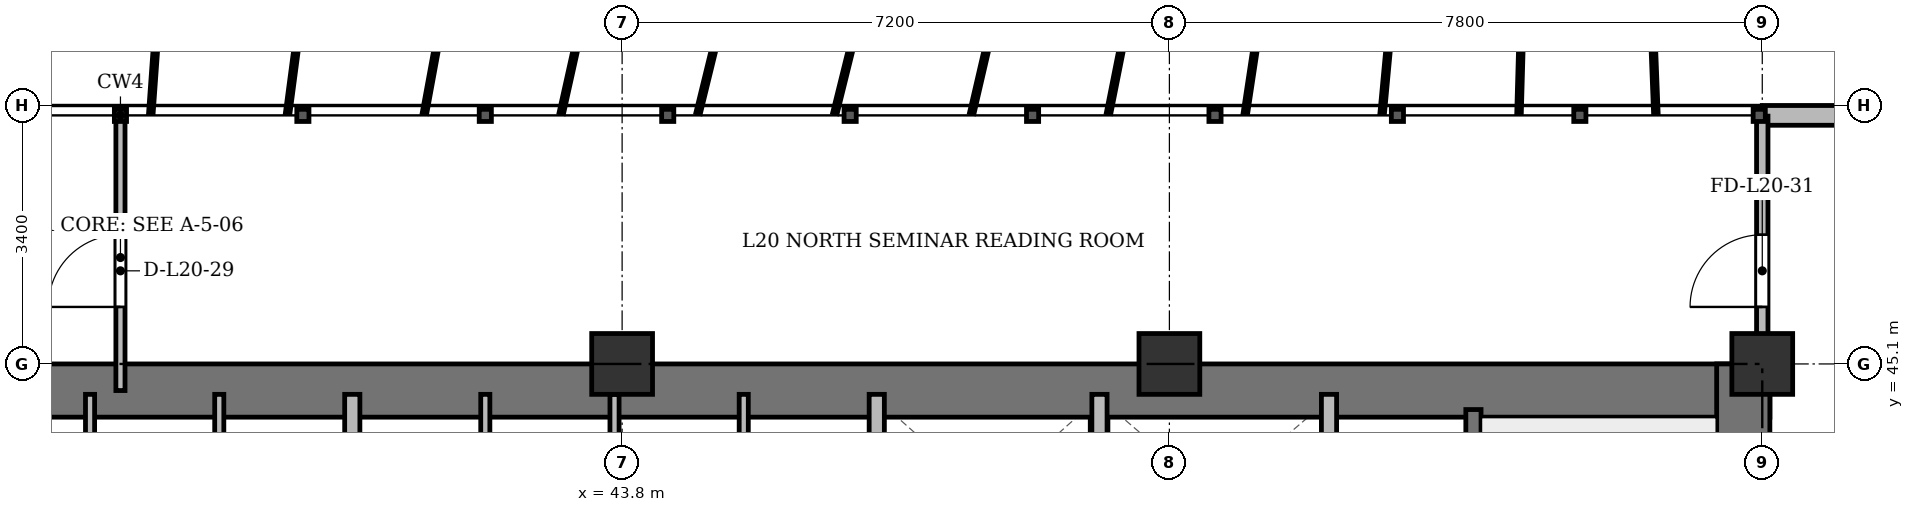
"""IFC4 building model, lengths in metres.
Left out: names, types, materials, properties, quantities, classifications, styles, units other than length and angle.
Written with IfcOpenShell. Run it as: python <this file> out.ifc"""

import sys

from ifc_helpers import new_model, si_unit, direction, frame, frame_2d, origin, origin_2d, place, context, subcontext, project, spatial, rectangle, extrude, source, transform, mapped, element, fill, save


model = new_model("IFC4")
c1 = context("Model", 3, precision=1e-05, world=origin(), true_north=direction((0.0, 1.0)))
c2 = subcontext(c1, "Body", "Model", "MODEL_VIEW")
j1 = project(units=[si_unit("LENGTHUNIT", "METRE"), si_unit("PLANEANGLEUNIT", "RADIAN")], contexts=[c1])
p1 = place(None, origin())
s1 = spatial("IfcSite", under=j1, at=p1, CompositionType="ELEMENT")
p2 = place(p1, origin())
s2 = spatial("IfcBuilding", under=s1, at=p2, CompositionType="ELEMENT")
p3 = place(p2, frame((0.0, 0.0, 81.7)))
s3 = spatial("IfcBuildingStorey", under=s2, at=p3, CompositionType="ELEMENT", Elevation=81.7)
m1 = source(origin(), c2, "Body", "SweptSolid", [
    extrude(rectangle(XDim=0.8, YDim=0.8, at=origin_2d()), origin(), (0.0, 0.0, 1.0), 3.6),
])
for number, where, z_axis, x_axis in (
    (1, (43.8, 45.1, 0.0), (0.0, 0.0, 1.0), (1.0, 0.0, 0.0)),
    (2, (51.0, 45.1, 0.0), (0.0, 0.0, 1.0), (1.0, 0.0, 0.0)),
    (3, (58.8, 45.1, 0.0), (0.0, 0.0, 1.0), (1.0, 0.0, 0.0)),
):
    element("IfcColumn", number, at=place(p3, frame(where, z_axis=z_axis, x_axis=x_axis)), inside=s3, PredefinedType="COLUMN", context=c2, shape_type="MappedRepresentation", body=[
        mapped(m1, transform((0.0, 0.0, 0.0), x_axis=(1.0, 0.0, 0.0), y_axis=(0.0, 1.0, 0.0), z_axis=(0.0, 0.0, 1.0), scale=1.0)),
    ])
p4 = place(p3, frame((58.8, 48.37, 0.0), z_axis=(0.0, 0.0, 1.0), x_axis=(1.0, 0.0, 0.0)))
e4 = element("IfcWall", 4, at=p4, inside=s3, PredefinedType="SOLIDWALL", context=c2, shape_type="SweptSolid", body=[
    extrude(rectangle(XDim=8.0, YDim=0.26, at=frame_2d((4.0, 0.0))), origin(), (0.0, 0.0, 1.0), 3.34),
])
p5 = place(p4, frame((2.192, 0.0, 0.9)))
e5 = element("IfcOpeningElement", 5, at=p5, cuts=e4, PredefinedType="OPENING", context=c2, shape_type="SweptSolid", body=[
    extrude(rectangle(XDim=1.2, YDim=1.65, at=frame_2d((0.6, 0.825))), frame((0.0, 0.14, 0.0), z_axis=(0.0, -1.0, 0.0), x_axis=(1.0, 0.0, 0.0)), (0.0, 0.0, 1.0), 0.28),
])
p6 = place(p4, frame((6.033, 0.0, 0.9)))
e6 = element("IfcOpeningElement", 6, at=p6, cuts=e4, PredefinedType="OPENING", context=c2, shape_type="SweptSolid", body=[
    extrude(rectangle(XDim=1.2, YDim=1.65, at=frame_2d((0.6, 0.825))), frame((0.0, 0.14, 0.0), z_axis=(0.0, -1.0, 0.0), x_axis=(1.0, 0.0, 0.0)), (0.0, 0.0, 1.0), 0.28),
])
p7 = place(p3, frame((15.5, 44.75, 0.0), z_axis=(0.0, 0.0, 1.0), x_axis=(1.0, 0.0, 0.0)))
e7 = element("IfcWall", 7, at=p7, inside=s3, PredefinedType="SHEAR", context=c2, shape_type="SweptSolid", body=[
    extrude(rectangle(XDim=43.4, YDim=0.7, at=frame_2d((21.7, 0.0))), origin(), (0.0, 0.0, 1.0), 3.34),
])
p8 = place(p3, frame((58.55, 33.4, 0.0), z_axis=(0.0, 0.0, 1.0), x_axis=(0.0, 1.0, 0.0)))
e8 = element("IfcWall", 8, at=p8, inside=s3, PredefinedType="SHEAR", context=c2, shape_type="SweptSolid", body=[
    extrude(rectangle(XDim=11.7, YDim=0.7, at=frame_2d((5.85, 0.0))), origin(), (0.0, 0.0, 1.0), 3.34),
])
p9 = place(p3, frame((55.0, 33.4, 0.0), z_axis=(0.0, 0.0, 1.0), x_axis=(0.0, 1.0, 0.0)))
e9 = element("IfcWall", 9, at=p9, inside=s3, PredefinedType="SHEAR", context=c2, shape_type="SweptSolid", body=[
    extrude(rectangle(XDim=11.1, YDim=0.2, at=frame_2d((5.55, 0.0))), origin(), (0.0, 0.0, 1.0), 3.34),
])
p10 = place(p9, frame((0.85, 0.0, 0.0)))
e10 = element("IfcOpeningElement", 10, at=p10, cuts=e9, PredefinedType="OPENING", context=c2, shape_type="SweptSolid", body=[
    extrude(rectangle(XDim=1.1, YDim=2.15, at=frame_2d((0.55, 1.075))), frame((0.0, 0.11, 0.0), z_axis=(0.0, -1.0, 0.0), x_axis=(1.0, 0.0, 0.0)), (0.0, 0.0, 1.0), 0.22),
])
for number, where, z_axis, x_axis in (
    (11, (36.8, 41.5, 0.0), (0.0, 0.0, 1.0), (0.0, 1.0, 0.0)),
    (12, (38.5, 41.5, 0.0), (0.0, 0.0, 1.0), (0.0, 1.0, 0.0)),
):
    element("IfcWall", number, at=place(p3, frame(where, z_axis=z_axis, x_axis=x_axis)), inside=s3, PredefinedType="PARTITIONING", context=c2, shape_type="SweptSolid", body=[
        extrude(rectangle(XDim=3.2, YDim=0.12, at=frame_2d((1.6, 0.0))), origin(), (0.0, 0.0, 1.0), 3.34),
    ])
p11 = place(p3, frame((40.25, 41.5, 0.0), z_axis=(0.0, 0.0, 1.0), x_axis=(0.0, 1.0, 0.0)))
e13 = element("IfcWall", 13, at=p11, inside=s3, PredefinedType="SOLIDWALL", context=c2, shape_type="SweptSolid", body=[
    extrude(rectangle(XDim=3.2, YDim=0.2, at=frame_2d((1.6, 0.0))), origin(), (0.0, 0.0, 1.0), 3.34),
])
p12 = place(p3, frame((42.0, 41.5, 0.0), z_axis=(0.0, 0.0, 1.0), x_axis=(0.0, 1.0, 0.0)))
e14 = element("IfcWall", 14, at=p12, inside=s3, PredefinedType="PARTITIONING", context=c2, shape_type="SweptSolid", body=[
    extrude(rectangle(XDim=3.2, YDim=0.12, at=frame_2d((1.6, 0.0))), origin(), (0.0, 0.0, 1.0), 3.34),
])
p13 = place(p3, frame((43.7, 41.5, 0.0), z_axis=(0.0, 0.0, 1.0), x_axis=(0.0, 1.0, 0.0)))
e15 = element("IfcWall", 15, at=p13, inside=s3, PredefinedType="PARTITIONING", context=c2, shape_type="SweptSolid", body=[
    extrude(rectangle(XDim=3.2, YDim=0.12, at=frame_2d((1.6, 0.0))), origin(), (0.0, 0.0, 1.0), 2.84),
])
p14 = place(p3, frame((45.4, 41.5, 0.0), z_axis=(0.0, 0.0, 1.0), x_axis=(0.0, 1.0, 0.0)))
e16 = element("IfcWall", 16, at=p14, inside=s3, PredefinedType="PARTITIONING", context=c2, shape_type="SweptSolid", body=[
    extrude(rectangle(XDim=3.2, YDim=0.12, at=frame_2d((1.6, 0.0))), origin(), (0.0, 0.0, 1.0), 3.34),
])
p15 = place(p3, frame((47.15, 33.4, 0.0), z_axis=(0.0, 0.0, 1.0), x_axis=(0.0, 1.0, 0.0)))
e17 = element("IfcWall", 17, at=p15, inside=s3, PredefinedType="SOLIDWALL", context=c2, shape_type="SweptSolid", body=[
    extrude(rectangle(XDim=11.3, YDim=0.2, at=frame_2d((5.65, 0.0))), origin(), (0.0, 0.0, 1.0), 2.752),
])
for number, where, z_axis, x_axis in (
    (18, (50.08, 42.05, 0.0), (0.0, 0.0, 1.0), (0.0, 1.0, 0.0)),
    (19, (53.1, 42.05, 0.0), (0.0, 0.0, 1.0), (0.0, 1.0, 0.0)),
):
    element("IfcWall", number, at=place(p3, frame(where, z_axis=z_axis, x_axis=x_axis)), inside=s3, PredefinedType="SOLIDWALL", context=c2, shape_type="SweptSolid", body=[
        extrude(rectangle(XDim=2.65, YDim=0.2, at=frame_2d((1.325, 0.0))), origin(), (0.0, 0.0, 1.0), 3.34),
    ])
p16 = place(p3, frame((37.2, 44.75, 0.0), z_axis=(0.0, 0.0, 1.0), x_axis=(0.0, 1.0, 0.0)))
e20 = element("IfcWall", 20, at=p16, inside=s3, PredefinedType="PARTITIONING", context=c2, shape_type="SweptSolid", body=[
    extrude(rectangle(XDim=3.61, YDim=0.12, at=frame_2d((1.805, 0.0))), origin(), (0.0, 0.0, 1.0), 2.752),
])
p17 = place(p16, frame((1.1, 0.0, 0.0)))
e21 = element("IfcOpeningElement", 21, at=p17, cuts=e20, PredefinedType="OPENING", context=c2, shape_type="SweptSolid", body=[
    extrude(rectangle(XDim=0.95, YDim=2.15, at=frame_2d((0.475, 1.075))), frame((0.0, 0.07, 0.0), z_axis=(0.0, -1.0, 0.0), x_axis=(1.0, 0.0, 0.0)), (0.0, 0.0, 1.0), 0.14),
])
p18 = place(p3, frame((58.8, 44.75, 0.0), z_axis=(0.0, 0.0, 1.0), x_axis=(0.0, 1.0, 0.0)))
e22 = element("IfcWall", 22, at=p18, inside=s3, PredefinedType="PARTITIONING", context=c2, shape_type="SweptSolid", body=[
    extrude(rectangle(XDim=3.61, YDim=0.15, at=frame_2d((1.805, 0.0))), origin(), (0.0, 0.0, 1.0), 2.84),
])
p19 = place(p18, frame((1.1, 0.0, 0.0)))
e23 = element("IfcOpeningElement", 23, at=p19, cuts=e22, PredefinedType="OPENING", context=c2, shape_type="SweptSolid", body=[
    extrude(rectangle(XDim=0.95, YDim=2.15, at=frame_2d((0.475, 1.075))), frame((0.0, 0.085, 0.0), z_axis=(0.0, -1.0, 0.0), x_axis=(1.0, 0.0, 0.0)), (0.0, 0.0, 1.0), 0.17),
])
m2 = source(origin(), c2, "Body", "SweptSolid", [
    extrude(rectangle(XDim=0.95, YDim=2.15, at=frame_2d((0.475, 1.075))), frame((0.0, 0.025, 0.0), z_axis=(0.0, -1.0, 0.0), x_axis=(1.0, 0.0, 0.0)), (0.0, 0.0, 1.0), 0.05),
])
p20 = place(p17, origin())
e24 = element("IfcDoor", 24, at=p20, inside=s3, OperationType="SINGLE_SWING_LEFT", PredefinedType="DOOR", context=c2, shape_type="MappedRepresentation", body=[
    mapped(m2, transform((0.0, 0.0, 0.0), x_axis=(1.0, 0.0, 0.0), y_axis=(0.0, 1.0, 0.0), z_axis=(0.0, 0.0, 1.0), scale=1.0)),
])
fill(e21, e24)
p21 = place(p19, origin())
e25 = element("IfcDoor", 25, at=p21, inside=s3, OperationType="SINGLE_SWING_LEFT", PredefinedType="DOOR", context=c2, shape_type="MappedRepresentation", body=[
    mapped(m2, transform((0.0, 0.0, 0.0), x_axis=(1.0, 0.0, 0.0), y_axis=(0.0, 1.0, 0.0), z_axis=(0.0, 0.0, 1.0), scale=1.0)),
])
fill(e23, e25)
save(model, sys.argv[1])
